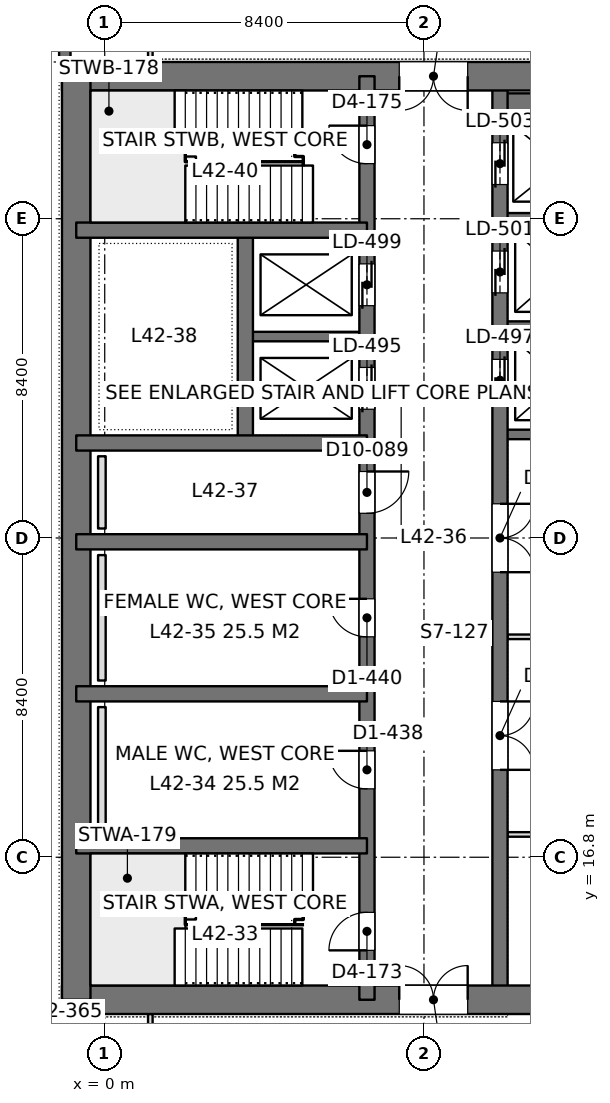
"""IFC4 building model, lengths in metres.
Left out: names, types, materials, properties, quantities, classifications, styles, units other than length and angle.
Written with IfcOpenShell. Run it as: python <this file> out.ifc"""

import sys

from ifc_helpers import new_model, si_unit, direction, frame, frame_2d, origin, place, context, subcontext, project, spatial, rectangle, extrude, element, fill, save


model = new_model("IFC4")
c1 = context("Model", 3, precision=1e-05, world=origin(), true_north=direction((0.0, 1.0)))
c2 = subcontext(c1, "Body", "Model", "MODEL_VIEW")
j1 = project(units=[si_unit("LENGTHUNIT", "METRE"), si_unit("PLANEANGLEUNIT", "RADIAN")], contexts=[c1])
p1 = place(None, origin())
s1 = spatial("IfcSite", under=j1, at=p1, CompositionType="ELEMENT")
p2 = place(p1, origin())
s2 = spatial("IfcBuilding", under=s1, at=p2, CompositionType="ELEMENT")
p3 = place(p2, frame((0.0, 0.0, 186.0)))
s3 = spatial("IfcBuildingStorey", under=s2, at=p3, CompositionType="ELEMENT", Elevation=186.0)
p4 = place(p3, frame((-1.125, 13.05, 0.0), z_axis=(0.0, 0.0, 1.0), x_axis=(1.0, 0.0, 0.0)))
e1 = element("IfcWall", 1, at=p4, inside=s3, PredefinedType="SHEAR", context=c2, shape_type="SweptSolid", body=[
    extrude(rectangle(XDim=17.85, YDim=0.75, at=frame_2d((8.925, 0.0))), origin(), (0.0, 0.0, 1.0), 4.2),
])
p5 = place(p4, frame((8.875, 0.0, 0.0)))
e2 = element("IfcOpeningElement", 2, at=p5, cuts=e1, PredefinedType="OPENING", context=c2, shape_type="SweptSolid", body=[
    extrude(rectangle(XDim=1.8, YDim=2.4, at=frame_2d((0.9, 1.2))), frame((0.0, 0.385, 0.0), z_axis=(0.0, -1.0, 0.0), x_axis=(1.0, 0.0, 0.0)), (0.0, 0.0, 1.0), 0.77),
])
p6 = place(p3, frame((-1.125, 37.35, 0.0), z_axis=(0.0, 0.0, 1.0), x_axis=(1.0, 0.0, 0.0)))
e3 = element("IfcWall", 3, at=p6, inside=s3, PredefinedType="SHEAR", context=c2, shape_type="SweptSolid", body=[
    extrude(rectangle(XDim=17.85, YDim=0.75, at=frame_2d((8.925, 0.0))), origin(), (0.0, 0.0, 1.0), 4.2),
])
p7 = place(p6, frame((8.875, 0.0, 0.0)))
e4 = element("IfcOpeningElement", 4, at=p7, cuts=e3, PredefinedType="OPENING", context=c2, shape_type="SweptSolid", body=[
    extrude(rectangle(XDim=1.8, YDim=2.4, at=frame_2d((0.9, 1.2))), frame((0.0, 0.385, 0.0), z_axis=(0.0, -1.0, 0.0), x_axis=(1.0, 0.0, 0.0)), (0.0, 0.0, 1.0), 0.77),
])
p8 = place(p3, frame((-0.75, 13.05, 0.0), z_axis=(0.0, 0.0, 1.0), x_axis=(0.0, 1.0, 0.0)))
e5 = element("IfcWall", 5, at=p8, inside=s3, PredefinedType="SHEAR", context=c2, shape_type="SweptSolid", body=[
    extrude(rectangle(XDim=24.3, YDim=0.75, at=frame_2d((12.15, 0.0))), origin(), (0.0, 0.0, 1.0), 4.2),
])
p9 = place(p3, frame((6.9, 13.05, 0.0), z_axis=(0.0, 0.0, 1.0), x_axis=(0.0, 1.0, 0.0)))
e6 = element("IfcWall", 6, at=p9, inside=s3, PredefinedType="SHEAR", context=c2, shape_type="SweptSolid", body=[
    extrude(rectangle(XDim=24.3, YDim=0.4, at=frame_2d((12.15, 0.0))), origin(), (0.0, 0.0, 1.0), 4.2),
])
p10 = place(p9, frame((1.3, 0.0, 0.0)))
e7 = element("IfcOpeningElement", 7, at=p10, cuts=e6, PredefinedType="OPENING", context=c2, shape_type="SweptSolid", body=[
    extrude(rectangle(XDim=1.0, YDim=2.2, at=frame_2d((0.5, 1.1))), frame((0.0, 0.21, 0.0), z_axis=(0.0, -1.0, 0.0), x_axis=(1.0, 0.0, 0.0)), (0.0, 0.0, 1.0), 0.42),
])
p11 = place(p9, frame((22.0, 0.0, 0.0)))
e8 = element("IfcOpeningElement", 8, at=p11, cuts=e6, PredefinedType="OPENING", context=c2, shape_type="SweptSolid", body=[
    extrude(rectangle(XDim=1.0, YDim=2.2, at=frame_2d((0.5, 1.1))), frame((0.0, 0.21, 0.0), z_axis=(0.0, -1.0, 0.0), x_axis=(1.0, 0.0, 0.0)), (0.0, 0.0, 1.0), 0.42),
])
p12 = place(p9, frame((5.55, 0.0, 0.0)))
e9 = element("IfcOpeningElement", 9, at=p12, cuts=e6, PredefinedType="OPENING", context=c2, shape_type="SweptSolid", body=[
    extrude(rectangle(XDim=1.0, YDim=2.2, at=frame_2d((0.5, 1.1))), frame((0.0, 0.21, 0.0), z_axis=(0.0, -1.0, 0.0), x_axis=(1.0, 0.0, 0.0)), (0.0, 0.0, 1.0), 0.42),
])
p13 = place(p9, frame((9.55, 0.0, 0.0)))
e10 = element("IfcOpeningElement", 10, at=p13, cuts=e6, PredefinedType="OPENING", context=c2, shape_type="SweptSolid", body=[
    extrude(rectangle(XDim=1.0, YDim=2.2, at=frame_2d((0.5, 1.1))), frame((0.0, 0.21, 0.0), z_axis=(0.0, -1.0, 0.0), x_axis=(1.0, 0.0, 0.0)), (0.0, 0.0, 1.0), 0.42),
])
p14 = place(p9, frame((12.8, 0.0, 0.0)))
e11 = element("IfcOpeningElement", 11, at=p14, cuts=e6, PredefinedType="OPENING", context=c2, shape_type="SweptSolid", body=[
    extrude(rectangle(XDim=1.1, YDim=2.2, at=frame_2d((0.55, 1.1))), frame((0.0, 0.21, 0.0), z_axis=(0.0, -1.0, 0.0), x_axis=(1.0, 0.0, 0.0)), (0.0, 0.0, 1.0), 0.42),
])
p15 = place(p9, frame((15.538, 0.0, 0.0)))
e12 = element("IfcOpeningElement", 12, at=p15, cuts=e6, PredefinedType="OPENING", context=c2, shape_type="SweptSolid", body=[
    extrude(rectangle(XDim=1.1, YDim=2.2, at=frame_2d((0.55, 1.1))), frame((0.0, 0.21, 0.0), z_axis=(0.0, -1.0, 0.0), x_axis=(1.0, 0.0, 0.0)), (0.0, 0.0, 1.0), 0.42),
])
p16 = place(p9, frame((18.262, 0.0, 0.0)))
e13 = element("IfcOpeningElement", 13, at=p16, cuts=e6, PredefinedType="OPENING", context=c2, shape_type="SweptSolid", body=[
    extrude(rectangle(XDim=1.1, YDim=2.2, at=frame_2d((0.55, 1.1))), frame((0.0, 0.21, 0.0), z_axis=(0.0, -1.0, 0.0), x_axis=(1.0, 0.0, 0.0)), (0.0, 0.0, 1.0), 0.42),
])
p17 = place(p3, frame((10.4, 13.05, 0.0), z_axis=(0.0, 0.0, 1.0), x_axis=(0.0, 1.0, 0.0)))
e14 = element("IfcWall", 14, at=p17, inside=s3, PredefinedType="SHEAR", context=c2, shape_type="SweptSolid", body=[
    extrude(rectangle(XDim=24.3, YDim=0.4, at=frame_2d((12.15, 0.0))), origin(), (0.0, 0.0, 1.0), 4.2),
])
p18 = place(p17, frame((15.75, 0.0, 0.0)))
e15 = element("IfcOpeningElement", 15, at=p18, cuts=e14, PredefinedType="OPENING", context=c2, shape_type="SweptSolid", body=[
    extrude(rectangle(XDim=1.1, YDim=2.2, at=frame_2d((0.55, 1.1))), frame((0.0, 0.21, 0.0), z_axis=(0.0, -1.0, 0.0), x_axis=(1.0, 0.0, 0.0)), (0.0, 0.0, 1.0), 0.42),
])
p19 = place(p17, frame((18.6, 0.0, 0.0)))
e16 = element("IfcOpeningElement", 16, at=p19, cuts=e14, PredefinedType="OPENING", context=c2, shape_type="SweptSolid", body=[
    extrude(rectangle(XDim=1.1, YDim=2.2, at=frame_2d((0.55, 1.1))), frame((0.0, 0.21, 0.0), z_axis=(0.0, -1.0, 0.0), x_axis=(1.0, 0.0, 0.0)), (0.0, 0.0, 1.0), 0.42),
])
p20 = place(p17, frame((21.45, 0.0, 0.0)))
e17 = element("IfcOpeningElement", 17, at=p20, cuts=e14, PredefinedType="OPENING", context=c2, shape_type="SweptSolid", body=[
    extrude(rectangle(XDim=1.1, YDim=2.2, at=frame_2d((0.55, 1.1))), frame((0.0, 0.21, 0.0), z_axis=(0.0, -1.0, 0.0), x_axis=(1.0, 0.0, 0.0)), (0.0, 0.0, 1.0), 0.42),
])
p21 = place(p17, frame((6.05, 0.0, 0.0)))
e18 = element("IfcOpeningElement", 18, at=p21, cuts=e14, PredefinedType="OPENING", context=c2, shape_type="SweptSolid", body=[
    extrude(rectangle(XDim=1.8, YDim=2.4, at=frame_2d((0.9, 1.2))), frame((0.0, 0.21, 0.0), z_axis=(0.0, -1.0, 0.0), x_axis=(1.0, 0.0, 0.0)), (0.0, 0.0, 1.0), 0.42),
])
p22 = place(p17, frame((11.25, 0.0, 0.0)))
e19 = element("IfcOpeningElement", 19, at=p22, cuts=e14, PredefinedType="OPENING", context=c2, shape_type="SweptSolid", body=[
    extrude(rectangle(XDim=1.8, YDim=2.4, at=frame_2d((0.9, 1.2))), frame((0.0, 0.21, 0.0), z_axis=(0.0, -1.0, 0.0), x_axis=(1.0, 0.0, 0.0)), (0.0, 0.0, 1.0), 0.42),
])
for number, where, z_axis, x_axis in (
    (20, (-0.75, 17.1, 0.0), (0.0, 0.0, 1.0), (1.0, 0.0, 0.0)),
    (21, (-0.75, 21.1, 0.0), (0.0, 0.0, 1.0), (1.0, 0.0, 0.0)),
    (22, (-0.75, 25.1, 0.0), (0.0, 0.0, 1.0), (1.0, 0.0, 0.0)),
    (23, (-0.75, 27.7, 0.0), (0.0, 0.0, 1.0), (1.0, 0.0, 0.0)),
    (24, (-0.75, 33.3, 0.0), (0.0, 0.0, 1.0), (1.0, 0.0, 0.0)),
):
    element("IfcWall", number, at=place(p3, frame(where, z_axis=z_axis, x_axis=x_axis)), inside=s3, PredefinedType="SHEAR", context=c2, shape_type="SweptSolid", body=[
        extrude(rectangle(XDim=7.65, YDim=0.4, at=frame_2d((3.825, 0.0))), origin(), (0.0, 0.0, 1.0), 4.2),
    ])
p23 = place(p3, frame((3.7, 27.7, 0.0), z_axis=(0.0, 0.0, 1.0), x_axis=(0.0, 1.0, 0.0)))
e25 = element("IfcWall", 25, at=p23, inside=s3, PredefinedType="SHEAR", context=c2, shape_type="SweptSolid", body=[
    extrude(rectangle(XDim=5.6, YDim=0.4, at=frame_2d((2.8, 0.0))), origin(), (0.0, 0.0, 1.0), 4.2),
])
p24 = place(p3, frame((3.7, 30.5, 0.0), z_axis=(0.0, 0.0, 1.0), x_axis=(1.0, 0.0, 0.0)))
e26 = element("IfcWall", 26, at=p24, inside=s3, PredefinedType="SHEAR", context=c2, shape_type="SweptSolid", body=[
    extrude(rectangle(XDim=3.2, YDim=0.25, at=frame_2d((1.6, 0.0))), origin(), (0.0, 0.0, 1.0), 4.2),
])
p25 = place(p3, frame((10.4, 27.925, 0.0), z_axis=(0.0, 0.0, 1.0), x_axis=(1.0, 0.0, 0.0)))
e27 = element("IfcWall", 27, at=p25, inside=s3, PredefinedType="SHEAR", context=c2, shape_type="SweptSolid", body=[
    extrude(rectangle(XDim=5.95, YDim=0.25, at=frame_2d((2.975, 0.0))), origin(), (0.0, 0.0, 1.0), 4.2),
])
for number, where, z_axis, x_axis in (
    (28, (10.4, 30.775, 0.0), (0.0, 0.0, 1.0), (1.0, 0.0, 0.0)),
    (29, (10.4, 33.625, 0.0), (0.0, 0.0, 1.0), (1.0, 0.0, 0.0)),
):
    element("IfcWall", number, at=place(p3, frame(where, z_axis=z_axis, x_axis=x_axis)), inside=s3, PredefinedType="SHEAR", context=c2, shape_type="SweptSolid", body=[
        extrude(rectangle(XDim=3.2, YDim=0.25, at=frame_2d((1.6, 0.0))), origin(), (0.0, 0.0, 1.0), 4.2),
    ])
p26 = place(p3, frame((10.4, 36.625, 0.0), z_axis=(0.0, 0.0, 1.0), x_axis=(1.0, 0.0, 0.0)))
e30 = element("IfcWall", 30, at=p26, inside=s3, PredefinedType="SHEAR", context=c2, shape_type="SweptSolid", body=[
    extrude(rectangle(XDim=3.2, YDim=0.55, at=frame_2d((1.6, 0.0))), origin(), (0.0, 0.0, 1.0), 4.2),
])
p27 = place(p3, frame((-1.05, 8.4, 0.0), z_axis=(0.0, 0.0, 1.0), x_axis=(0.0, 1.0, 0.0)))
e31 = element("IfcWall", 31, at=p27, inside=s3, PredefinedType="SOLIDWALL", context=c2, shape_type="SweptSolid", body=[
    extrude(rectangle(XDim=4.275, YDim=0.3, at=frame_2d((2.138, 0.0))), origin(), (0.0, 0.0, 1.0), 4.05),
])
p28 = place(p27, frame((0.938, 0.0, 0.9)))
e32 = element("IfcOpeningElement", 32, at=p28, cuts=e31, PredefinedType="OPENING", context=c2, shape_type="SweptSolid", body=[
    extrude(rectangle(XDim=2.4, YDim=1.9, at=frame_2d((1.2, 0.95))), frame((0.0, 0.16, 0.0), z_axis=(0.0, -1.0, 0.0), x_axis=(1.0, 0.0, 0.0)), (0.0, 0.0, 1.0), 0.32),
])
p29 = place(p3, frame((-1.05, 37.725, 0.0), z_axis=(0.0, 0.0, 1.0), x_axis=(0.0, 1.0, 0.0)))
e33 = element("IfcWall", 33, at=p29, inside=s3, PredefinedType="SOLIDWALL", context=c2, shape_type="SweptSolid", body=[
    extrude(rectangle(XDim=4.275, YDim=0.3, at=frame_2d((2.137, 0.0))), origin(), (0.0, 0.0, 1.0), 4.05),
])
p30 = place(p29, frame((0.938, 0.0, 0.9)))
e34 = element("IfcOpeningElement", 34, at=p30, cuts=e33, PredefinedType="OPENING", context=c2, shape_type="SweptSolid", body=[
    extrude(rectangle(XDim=2.4, YDim=1.9, at=frame_2d((1.2, 0.95))), frame((0.0, 0.16, 0.0), z_axis=(0.0, -1.0, 0.0), x_axis=(1.0, 0.0, 0.0)), (0.0, 0.0, 1.0), 0.32),
])
p31 = place(p3, frame((10.598, 17.4, 0.0), z_axis=(0.0, 0.0, 1.0), x_axis=(1.0, 0.0, 0.0)))
e35 = element("IfcWall", 35, at=p31, inside=s3, PredefinedType="PARTITIONING", context=c2, shape_type="SweptSolid", body=[
    extrude(rectangle(XDim=5.904, YDim=0.12, at=frame_2d((2.952, 0.0))), origin(), (0.0, 0.0, 1.0), 3.55),
])
p32 = place(p3, frame((10.598, 22.6, 0.0), z_axis=(0.0, 0.0, 1.0), x_axis=(1.0, 0.0, 0.0)))
e36 = element("IfcWall", 36, at=p32, inside=s3, PredefinedType="PARTITIONING", context=c2, shape_type="SweptSolid", body=[
    extrude(rectangle(XDim=5.053, YDim=0.12, at=frame_2d((2.526, 0.0))), origin(), (0.0, 0.0, 1.0), 4.05),
])
for number, where, z_axis, x_axis in (
    (37, (1.2, 11.1, 0.0), (0.0, 0.0, 1.0), (0.0, 1.0, 0.0)),
    (38, (1.2, 37.724, 0.0), (0.0, 0.0, 1.0), (0.0, 1.0, 0.0)),
):
    element("IfcWall", number, at=place(p3, frame(where, z_axis=z_axis, x_axis=x_axis)), inside=s3, PredefinedType="PARTITIONING", context=c2, shape_type="SweptSolid", body=[
        extrude(rectangle(XDim=1.576, YDim=0.12, at=frame_2d((0.788, 0.0))), origin(), (0.0, 0.0, 1.0), 4.05),
    ])
for number, where, z_axis, x_axis in (
    (39, (-0.075, 17.45, 0.0), (0.0, 0.0, 1.0), (0.0, 1.0, 0.0)),
    (40, (-0.075, 21.45, 0.0), (0.0, 0.0, 1.0), (0.0, 1.0, 0.0)),
):
    element("IfcWall", number, at=place(p3, frame(where, z_axis=z_axis, x_axis=x_axis)), inside=s3, PredefinedType="PLUMBINGWALL", context=c2, shape_type="SweptSolid", body=[
        extrude(rectangle(XDim=3.3, YDim=0.2, at=frame_2d((1.65, 0.0))), origin(), (0.0, 0.0, 1.0), 1.2),
    ])
p33 = place(p3, frame((-0.075, 25.45, 0.0), z_axis=(0.0, 0.0, 1.0), x_axis=(0.0, 1.0, 0.0)))
e41 = element("IfcWall", 41, at=p33, inside=s3, PredefinedType="PLUMBINGWALL", context=c2, shape_type="SweptSolid", body=[
    extrude(rectangle(XDim=1.9, YDim=0.2, at=frame_2d((0.95, 0.0))), origin(), (0.0, 0.0, 1.0), 1.2),
])
p34 = place(p5, origin())
e42 = element("IfcDoor", 42, at=p34, inside=s3, OperationType="DOUBLE_DOOR_SINGLE_SWING", PredefinedType="DOOR", context=c2, shape_type="SweptSolid", body=[
    extrude(rectangle(XDim=1.8, YDim=2.4, at=frame_2d((0.9, 1.2))), frame((0.0, 0.025, 0.0), z_axis=(0.0, -1.0, 0.0), x_axis=(1.0, 0.0, 0.0)), (0.0, 0.0, 1.0), 0.05),
])
fill(e2, e42)
p35 = place(p7, frame((1.8, 0.0, 0.0), z_axis=(0.0, 0.0, 1.0), x_axis=(-1.0, 0.0, 0.0)))
e43 = element("IfcDoor", 43, at=p35, inside=s3, OperationType="DOUBLE_DOOR_SINGLE_SWING", PredefinedType="DOOR", context=c2, shape_type="SweptSolid", body=[
    extrude(rectangle(XDim=1.8, YDim=2.4, at=frame_2d((0.9, 1.2))), frame((0.0, 0.025, 0.0), z_axis=(0.0, -1.0, 0.0), x_axis=(1.0, 0.0, 0.0)), (0.0, 0.0, 1.0), 0.05),
])
fill(e4, e43)
p36 = place(p10, origin())
e44 = element("IfcDoor", 44, at=p36, inside=s3, OperationType="SINGLE_SWING_LEFT", PredefinedType="DOOR", context=c2, shape_type="SweptSolid", body=[
    extrude(rectangle(XDim=1.0, YDim=2.2, at=frame_2d((0.5, 1.1))), frame((0.0, 0.025, 0.0), z_axis=(0.0, -1.0, 0.0), x_axis=(1.0, 0.0, 0.0)), (0.0, 0.0, 1.0), 0.05),
])
fill(e7, e44)
p37 = place(p11, origin())
e45 = element("IfcDoor", 45, at=p37, inside=s3, OperationType="SINGLE_SWING_RIGHT", PredefinedType="DOOR", context=c2, shape_type="SweptSolid", body=[
    extrude(rectangle(XDim=1.0, YDim=2.2, at=frame_2d((0.5, 1.1))), frame((0.0, 0.025, 0.0), z_axis=(0.0, -1.0, 0.0), x_axis=(1.0, 0.0, 0.0)), (0.0, 0.0, 1.0), 0.05),
])
fill(e8, e45)
p38 = place(p12, origin())
e46 = element("IfcDoor", 46, at=p38, inside=s3, OperationType="SINGLE_SWING_RIGHT", PredefinedType="DOOR", context=c2, shape_type="SweptSolid", body=[
    extrude(rectangle(XDim=1.0, YDim=2.2, at=frame_2d((0.5, 1.1))), frame((0.0, 0.025, 0.0), z_axis=(0.0, -1.0, 0.0), x_axis=(1.0, 0.0, 0.0)), (0.0, 0.0, 1.0), 0.05),
])
fill(e9, e46)
p39 = place(p13, origin())
e47 = element("IfcDoor", 47, at=p39, inside=s3, OperationType="SINGLE_SWING_RIGHT", PredefinedType="DOOR", context=c2, shape_type="SweptSolid", body=[
    extrude(rectangle(XDim=1.0, YDim=2.2, at=frame_2d((0.5, 1.1))), frame((0.0, 0.025, 0.0), z_axis=(0.0, -1.0, 0.0), x_axis=(1.0, 0.0, 0.0)), (0.0, 0.0, 1.0), 0.05),
])
fill(e10, e47)
p40 = place(p14, frame((1.1, 0.0, 0.0), z_axis=(0.0, 0.0, 1.0), x_axis=(-1.0, 0.0, 0.0)))
e48 = element("IfcDoor", 48, at=p40, inside=s3, OperationType="SINGLE_SWING_LEFT", PredefinedType="DOOR", context=c2, shape_type="SweptSolid", body=[
    extrude(rectangle(XDim=1.1, YDim=2.2, at=frame_2d((0.55, 1.1))), frame((0.0, 0.025, 0.0), z_axis=(0.0, -1.0, 0.0), x_axis=(1.0, 0.0, 0.0)), (0.0, 0.0, 1.0), 0.05),
])
fill(e11, e48)
p41 = place(p18, origin())
e49 = element("IfcDoor", 49, at=p41, inside=s3, OperationType="DOUBLE_DOOR_SLIDING", PredefinedType="DOOR", context=c2, shape_type="SweptSolid", body=[
    extrude(rectangle(XDim=1.1, YDim=2.2, at=frame_2d((0.55, 1.1))), frame((0.0, 0.025, 0.0), z_axis=(0.0, -1.0, 0.0), x_axis=(1.0, 0.0, 0.0)), (0.0, 0.0, 1.0), 0.05),
])
fill(e15, e49)
p42 = place(p19, origin())
e50 = element("IfcDoor", 50, at=p42, inside=s3, OperationType="DOUBLE_DOOR_SLIDING", PredefinedType="DOOR", context=c2, shape_type="SweptSolid", body=[
    extrude(rectangle(XDim=1.1, YDim=2.2, at=frame_2d((0.55, 1.1))), frame((0.0, 0.025, 0.0), z_axis=(0.0, -1.0, 0.0), x_axis=(1.0, 0.0, 0.0)), (0.0, 0.0, 1.0), 0.05),
])
fill(e16, e50)
p43 = place(p20, origin())
e51 = element("IfcDoor", 51, at=p43, inside=s3, OperationType="DOUBLE_DOOR_SLIDING", PredefinedType="DOOR", context=c2, shape_type="SweptSolid", body=[
    extrude(rectangle(XDim=1.1, YDim=2.2, at=frame_2d((0.55, 1.1))), frame((0.0, 0.025, 0.0), z_axis=(0.0, -1.0, 0.0), x_axis=(1.0, 0.0, 0.0)), (0.0, 0.0, 1.0), 0.05),
])
fill(e17, e51)
p44 = place(p15, origin())
e52 = element("IfcDoor", 52, at=p44, inside=s3, OperationType="DOUBLE_DOOR_SLIDING", PredefinedType="DOOR", context=c2, shape_type="SweptSolid", body=[
    extrude(rectangle(XDim=1.1, YDim=2.2, at=frame_2d((0.55, 1.1))), frame((0.0, 0.025, 0.0), z_axis=(0.0, -1.0, 0.0), x_axis=(1.0, 0.0, 0.0)), (0.0, 0.0, 1.0), 0.05),
])
fill(e12, e52)
p45 = place(p16, origin())
e53 = element("IfcDoor", 53, at=p45, inside=s3, OperationType="DOUBLE_DOOR_SLIDING", PredefinedType="DOOR", context=c2, shape_type="SweptSolid", body=[
    extrude(rectangle(XDim=1.1, YDim=2.2, at=frame_2d((0.55, 1.1))), frame((0.0, 0.025, 0.0), z_axis=(0.0, -1.0, 0.0), x_axis=(1.0, 0.0, 0.0)), (0.0, 0.0, 1.0), 0.05),
])
fill(e13, e53)
p46 = place(p21, frame((1.8, 0.0, 0.0), z_axis=(0.0, 0.0, 1.0), x_axis=(-1.0, 0.0, 0.0)))
e54 = element("IfcDoor", 54, at=p46, inside=s3, OperationType="DOUBLE_DOOR_SINGLE_SWING", PredefinedType="DOOR", context=c2, shape_type="SweptSolid", body=[
    extrude(rectangle(XDim=1.8, YDim=2.4, at=frame_2d((0.9, 1.2))), frame((0.0, 0.025, 0.0), z_axis=(0.0, -1.0, 0.0), x_axis=(1.0, 0.0, 0.0)), (0.0, 0.0, 1.0), 0.05),
])
fill(e18, e54)
p47 = place(p22, frame((1.8, 0.0, 0.0), z_axis=(0.0, 0.0, 1.0), x_axis=(-1.0, 0.0, 0.0)))
e55 = element("IfcDoor", 55, at=p47, inside=s3, OperationType="DOUBLE_DOOR_SINGLE_SWING", PredefinedType="DOOR", context=c2, shape_type="SweptSolid", body=[
    extrude(rectangle(XDim=1.8, YDim=2.4, at=frame_2d((0.9, 1.2))), frame((0.0, 0.025, 0.0), z_axis=(0.0, -1.0, 0.0), x_axis=(1.0, 0.0, 0.0)), (0.0, 0.0, 1.0), 0.05),
])
fill(e19, e55)
save(model, sys.argv[1])
